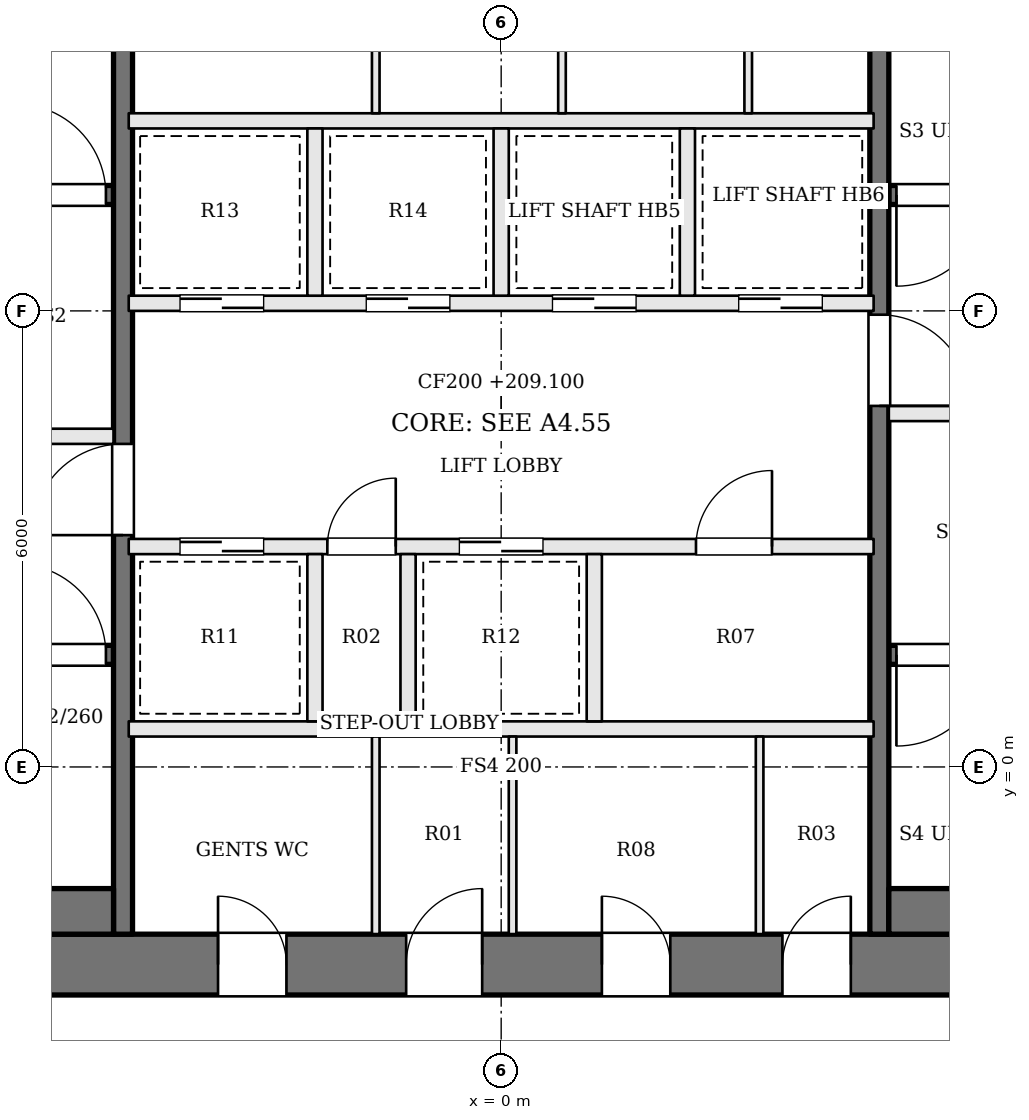
"""IFC4 building model, lengths in metres.
Left out: names, types, materials, properties, quantities, classifications, styles, units other than length and angle.
Written with IfcOpenShell. Run it as: python <this file> out.ifc"""

import sys

from ifc_helpers import new_model, si_unit, direction, frame, frame_2d, origin, place, context, subcontext, project, spatial, rectangle, extrude, element, fill, save


model = new_model("IFC4")
c1 = context("Model", 3, precision=1e-05, world=origin(), true_north=direction((0.0, 1.0)))
c2 = subcontext(c1, "Body", "Model", "MODEL_VIEW")
j1 = project(units=[si_unit("LENGTHUNIT", "METRE"), si_unit("PLANEANGLEUNIT", "RADIAN")], contexts=[c1])
p1 = place(None, origin())
s1 = spatial("IfcSite", under=j1, at=p1, CompositionType="ELEMENT")
p2 = place(p1, origin())
s2 = spatial("IfcBuilding", under=s1, at=p2, CompositionType="ELEMENT")
p3 = place(p2, frame((0.0, 0.0, 209.1)))
s3 = spatial("IfcBuildingStorey", under=s2, at=p3, CompositionType="ELEMENT", Elevation=209.1)
p4 = place(p3, frame((-13.0, -2.6, 0.0), z_axis=(0.0, 0.0, 1.0), x_axis=(1.0, 0.0, 0.0)))
e1 = element("IfcWall", 1, at=p4, inside=s3, PredefinedType="SHEAR", context=c2, shape_type="SweptSolid", body=[
    extrude(rectangle(XDim=26.0, YDim=0.8, at=frame_2d((13.0, 0.0))), origin(), (0.0, 0.0, 1.0), 3.9),
])
p5 = place(p4, frame((9.275, 0.0, 0.0)))
e2 = element("IfcOpeningElement", 2, at=p5, cuts=e1, PredefinedType="OPENING", context=c2, shape_type="SweptSolid", body=[
    extrude(rectangle(XDim=0.9, YDim=2.1, at=frame_2d((0.45, 1.05))), frame((0.0, 0.41, 0.0), z_axis=(0.0, -1.0, 0.0), x_axis=(1.0, 0.0, 0.0)), (0.0, 0.0, 1.0), 0.82),
])
p6 = place(p4, frame((11.75, 0.0, 0.0)))
e3 = element("IfcOpeningElement", 3, at=p6, cuts=e1, PredefinedType="OPENING", context=c2, shape_type="SweptSolid", body=[
    extrude(rectangle(XDim=1.0, YDim=2.1, at=frame_2d((0.5, 1.05))), frame((0.0, 0.41, 0.0), z_axis=(0.0, -1.0, 0.0), x_axis=(1.0, 0.0, 0.0)), (0.0, 0.0, 1.0), 0.82),
])
p7 = place(p4, frame((14.325, 0.0, 0.0)))
e4 = element("IfcOpeningElement", 4, at=p7, cuts=e1, PredefinedType="OPENING", context=c2, shape_type="SweptSolid", body=[
    extrude(rectangle(XDim=0.9, YDim=2.1, at=frame_2d((0.45, 1.05))), frame((0.0, 0.41, 0.0), z_axis=(0.0, -1.0, 0.0), x_axis=(1.0, 0.0, 0.0)), (0.0, 0.0, 1.0), 0.82),
])
p8 = place(p4, frame((16.7, 0.0, 0.0)))
e5 = element("IfcOpeningElement", 5, at=p8, cuts=e1, PredefinedType="OPENING", context=c2, shape_type="SweptSolid", body=[
    extrude(rectangle(XDim=0.9, YDim=2.1, at=frame_2d((0.45, 1.05))), frame((0.0, 0.41, 0.0), z_axis=(0.0, -1.0, 0.0), x_axis=(1.0, 0.0, 0.0)), (0.0, 0.0, 1.0), 0.82),
])
p9 = place(p3, frame((-12.2, 1.475, 0.0), z_axis=(0.0, 0.0, 1.0), x_axis=(1.0, 0.0, 0.0)))
e6 = element("IfcWall", 6, at=p9, inside=s3, PredefinedType="SOLIDWALL", context=c2, shape_type="SweptSolid", body=[
    extrude(rectangle(XDim=7.1, YDim=0.25, at=frame_2d((3.55, 0.0))), origin(), (0.0, 0.0, 1.0), 3.7),
])
p10 = place(p9, frame((5.8, 0.0, 0.0)))
e7 = element("IfcOpeningElement", 7, at=p10, cuts=e6, PredefinedType="OPENING", context=c2, shape_type="SweptSolid", body=[
    extrude(rectangle(XDim=1.2, YDim=2.1, at=frame_2d((0.6, 1.05))), frame((0.0, 0.135, 0.0), z_axis=(0.0, -1.0, 0.0), x_axis=(1.0, 0.0, 0.0)), (0.0, 0.0, 1.0), 0.27),
])
p11 = place(p3, frame((12.2, 7.525, 0.0), z_axis=(0.0, 0.0, 1.0), x_axis=(-1.0, 0.0, 0.0)))
e8 = element("IfcWall", 8, at=p11, inside=s3, PredefinedType="SOLIDWALL", context=c2, shape_type="SweptSolid", body=[
    extrude(rectangle(XDim=7.1, YDim=0.25, at=frame_2d((3.55, 0.0))), origin(), (0.0, 0.0, 1.0), 3.7),
])
p12 = place(p11, frame((5.8, 0.0, 0.0)))
e9 = element("IfcOpeningElement", 9, at=p12, cuts=e8, PredefinedType="OPENING", context=c2, shape_type="SweptSolid", body=[
    extrude(rectangle(XDim=1.2, YDim=2.1, at=frame_2d((0.6, 1.05))), frame((0.0, 0.135, 0.0), z_axis=(0.0, -1.0, 0.0), x_axis=(1.0, 0.0, 0.0)), (0.0, 0.0, 1.0), 0.27),
])
p13 = place(p3, frame((-12.2, 4.35, 0.0), z_axis=(0.0, 0.0, 1.0), x_axis=(1.0, 0.0, 0.0)))
e10 = element("IfcWall", 10, at=p13, inside=s3, PredefinedType="SOLIDWALL", context=c2, shape_type="SweptSolid", body=[
    extrude(rectangle(XDim=7.1, YDim=0.2, at=frame_2d((3.55, 0.0))), origin(), (0.0, 0.0, 1.0), 3.7),
])
p14 = place(p13, frame((4.4, 0.0, 0.0)))
e11 = element("IfcOpeningElement", 11, at=p14, cuts=e10, PredefinedType="OPENING", context=c2, shape_type="SweptSolid", body=[
    extrude(rectangle(XDim=1.2, YDim=2.1, at=frame_2d((0.6, 1.05))), frame((0.0, 0.11, 0.0), z_axis=(0.0, -1.0, 0.0), x_axis=(1.0, 0.0, 0.0)), (0.0, 0.0, 1.0), 0.22),
])
p15 = place(p13, frame((1.1, 0.0, 0.0)))
e12 = element("IfcOpeningElement", 12, at=p15, cuts=e10, PredefinedType="OPENING", context=c2, shape_type="SweptSolid", body=[
    extrude(rectangle(XDim=1.2, YDim=2.1, at=frame_2d((0.6, 1.05))), frame((0.0, 0.11, 0.0), z_axis=(0.0, -1.0, 0.0), x_axis=(1.0, 0.0, 0.0)), (0.0, 0.0, 1.0), 0.22),
])
p16 = place(p3, frame((12.2, 4.65, 0.0), z_axis=(0.0, 0.0, 1.0), x_axis=(-1.0, 0.0, 0.0)))
e13 = element("IfcWall", 13, at=p16, inside=s3, PredefinedType="SOLIDWALL", context=c2, shape_type="SweptSolid", body=[
    extrude(rectangle(XDim=7.1, YDim=0.2, at=frame_2d((3.55, 0.0))), origin(), (0.0, 0.0, 1.0), 3.7),
])
p17 = place(p16, frame((4.4, 0.0, 0.0)))
e14 = element("IfcOpeningElement", 14, at=p17, cuts=e13, PredefinedType="OPENING", context=c2, shape_type="SweptSolid", body=[
    extrude(rectangle(XDim=1.2, YDim=2.1, at=frame_2d((0.6, 1.05))), frame((0.0, 0.11, 0.0), z_axis=(0.0, -1.0, 0.0), x_axis=(1.0, 0.0, 0.0)), (0.0, 0.0, 1.0), 0.22),
])
p18 = place(p16, frame((1.1, 0.0, 0.0)))
e15 = element("IfcOpeningElement", 15, at=p18, cuts=e13, PredefinedType="OPENING", context=c2, shape_type="SweptSolid", body=[
    extrude(rectangle(XDim=1.2, YDim=2.1, at=frame_2d((0.6, 1.05))), frame((0.0, 0.11, 0.0), z_axis=(0.0, -1.0, 0.0), x_axis=(1.0, 0.0, 0.0)), (0.0, 0.0, 1.0), 0.22),
])
p19 = place(p3, frame((-12.2, 7.525, 0.0), z_axis=(0.0, 0.0, 1.0), x_axis=(1.0, 0.0, 0.0)))
e16 = element("IfcWall", 16, at=p19, inside=s3, PredefinedType="SOLIDWALL", context=c2, shape_type="SweptSolid", body=[
    extrude(rectangle(XDim=7.1, YDim=0.25, at=frame_2d((3.55, 0.0))), origin(), (0.0, 0.0, 1.0), 3.7),
])
p20 = place(p19, frame((5.8, 0.0, 0.0)))
e17 = element("IfcOpeningElement", 17, at=p20, cuts=e16, PredefinedType="OPENING", context=c2, shape_type="SweptSolid", body=[
    extrude(rectangle(XDim=1.2, YDim=2.1, at=frame_2d((0.6, 1.05))), frame((0.0, 0.135, 0.0), z_axis=(0.0, -1.0, 0.0), x_axis=(1.0, 0.0, 0.0)), (0.0, 0.0, 1.0), 0.27),
])
p21 = place(p3, frame((12.2, 1.475, 0.0), z_axis=(0.0, 0.0, 1.0), x_axis=(-1.0, 0.0, 0.0)))
e18 = element("IfcWall", 18, at=p21, inside=s3, PredefinedType="SOLIDWALL", context=c2, shape_type="SweptSolid", body=[
    extrude(rectangle(XDim=7.1, YDim=0.25, at=frame_2d((3.55, 0.0))), origin(), (0.0, 0.0, 1.0), 3.7),
])
p22 = place(p21, frame((5.8, 0.0, 0.0)))
e19 = element("IfcOpeningElement", 19, at=p22, cuts=e18, PredefinedType="OPENING", context=c2, shape_type="SweptSolid", body=[
    extrude(rectangle(XDim=1.2, YDim=2.1, at=frame_2d((0.6, 1.05))), frame((0.0, 0.135, 0.0), z_axis=(0.0, -1.0, 0.0), x_axis=(1.0, 0.0, 0.0)), (0.0, 0.0, 1.0), 0.27),
])
p23 = place(p3, frame((-4.975, -2.2, 0.0), z_axis=(0.0, 0.0, 1.0), x_axis=(0.0, 1.0, 0.0)))
e20 = element("IfcWall", 20, at=p23, inside=s3, PredefinedType="SOLIDWALL", context=c2, shape_type="SweptSolid", body=[
    extrude(rectangle(XDim=13.4, YDim=0.25, at=frame_2d((6.7, 0.0))), origin(), (0.0, 0.0, 1.0), 3.7),
])
p24 = place(p23, frame((5.25, 0.0, 0.0)))
e21 = element("IfcOpeningElement", 21, at=p24, cuts=e20, PredefinedType="OPENING", context=c2, shape_type="SweptSolid", body=[
    extrude(rectangle(XDim=1.2, YDim=2.1, at=frame_2d((0.6, 1.05))), frame((0.0, 0.135, 0.0), z_axis=(0.0, -1.0, 0.0), x_axis=(1.0, 0.0, 0.0)), (0.0, 0.0, 1.0), 0.27),
])
p25 = place(p3, frame((4.975, 11.2, 0.0), z_axis=(0.0, 0.0, 1.0), x_axis=(0.0, -1.0, 0.0)))
e22 = element("IfcWall", 22, at=p25, inside=s3, PredefinedType="SOLIDWALL", context=c2, shape_type="SweptSolid", body=[
    extrude(rectangle(XDim=13.4, YDim=0.25, at=frame_2d((6.7, 0.0))), origin(), (0.0, 0.0, 1.0), 3.7),
])
p26 = place(p25, frame((5.25, 0.0, 0.0)))
e23 = element("IfcOpeningElement", 23, at=p26, cuts=e22, PredefinedType="OPENING", context=c2, shape_type="SweptSolid", body=[
    extrude(rectangle(XDim=1.2, YDim=2.1, at=frame_2d((0.6, 1.05))), frame((0.0, 0.135, 0.0), z_axis=(0.0, -1.0, 0.0), x_axis=(1.0, 0.0, 0.0)), (0.0, 0.0, 1.0), 0.27),
])
for number, where, z_axis, x_axis in (
    (24, (-12.2, -1.9, 0.0), (0.0, 0.0, 1.0), (1.0, 0.0, 0.0)),
    (25, (12.2, -1.9, 0.0), (0.0, 0.0, 1.0), (-1.0, 0.0, 0.0)),
):
    element("IfcWall", number, at=place(p3, frame(where, z_axis=z_axis, x_axis=x_axis)), inside=s3, PredefinedType="SOLIDWALL", context=c2, shape_type="SweptSolid", body=[
        extrude(rectangle(XDim=7.1, YDim=0.6, at=frame_2d((3.55, 0.0))), origin(), (0.0, 0.0, 1.0), 3.7),
    ])
p27 = place(p3, frame((-4.9, 0.5, 0.0), z_axis=(0.0, 0.0, 1.0), x_axis=(1.0, 0.0, 0.0)))
e26 = element("IfcWall", 26, at=p27, inside=s3, PredefinedType="SOLIDWALL", context=c2, shape_type="SweptSolid", body=[
    extrude(rectangle(XDim=9.8, YDim=0.2, at=frame_2d((4.9, 0.0))), origin(), (0.0, 0.0, 1.0), 3.7),
])
p28 = place(p3, frame((-4.9, 2.9, 0.0), z_axis=(0.0, 0.0, 1.0), x_axis=(1.0, 0.0, 0.0)))
e27 = element("IfcWall", 27, at=p28, inside=s3, PredefinedType="SOLIDWALL", context=c2, shape_type="SweptSolid", body=[
    extrude(rectangle(XDim=9.8, YDim=0.2, at=frame_2d((4.9, 0.0))), origin(), (0.0, 0.0, 1.0), 3.7),
])
p29 = place(p28, frame((0.675, 0.0, 0.0)))
e28 = element("IfcOpeningElement", 28, at=p29, cuts=e27, PredefinedType="OPENING", context=c2, shape_type="SweptSolid", body=[
    extrude(rectangle(XDim=1.1, YDim=2.1, at=frame_2d((0.55, 1.05))), frame((0.0, 0.11, 0.0), z_axis=(0.0, -1.0, 0.0), x_axis=(1.0, 0.0, 0.0)), (0.0, 0.0, 1.0), 0.22),
])
p30 = place(p28, frame((2.613, 0.0, 0.0)))
e29 = element("IfcOpeningElement", 29, at=p30, cuts=e27, PredefinedType="OPENING", context=c2, shape_type="SweptSolid", body=[
    extrude(rectangle(XDim=0.9, YDim=2.1, at=frame_2d((0.45, 1.05))), frame((0.0, 0.11, 0.0), z_axis=(0.0, -1.0, 0.0), x_axis=(1.0, 0.0, 0.0)), (0.0, 0.0, 1.0), 0.22),
])
p31 = place(p28, frame((4.35, 0.0, 0.0)))
e30 = element("IfcOpeningElement", 30, at=p31, cuts=e27, PredefinedType="OPENING", context=c2, shape_type="SweptSolid", body=[
    extrude(rectangle(XDim=1.1, YDim=2.1, at=frame_2d((0.55, 1.05))), frame((0.0, 0.11, 0.0), z_axis=(0.0, -1.0, 0.0), x_axis=(1.0, 0.0, 0.0)), (0.0, 0.0, 1.0), 0.22),
])
p32 = place(p28, frame((7.463, 0.0, 0.0)))
e31 = element("IfcOpeningElement", 31, at=p32, cuts=e27, PredefinedType="OPENING", context=c2, shape_type="SweptSolid", body=[
    extrude(rectangle(XDim=1.0, YDim=2.1, at=frame_2d((0.5, 1.05))), frame((0.0, 0.11, 0.0), z_axis=(0.0, -1.0, 0.0), x_axis=(1.0, 0.0, 0.0)), (0.0, 0.0, 1.0), 0.22),
])
p33 = place(p3, frame((-4.9, 6.1, 0.0), z_axis=(0.0, 0.0, 1.0), x_axis=(1.0, 0.0, 0.0)))
e32 = element("IfcWall", 32, at=p33, inside=s3, PredefinedType="SOLIDWALL", context=c2, shape_type="SweptSolid", body=[
    extrude(rectangle(XDim=9.8, YDim=0.2, at=frame_2d((4.9, 0.0))), origin(), (0.0, 0.0, 1.0), 3.7),
])
p34 = place(p33, frame((0.675, 0.0, 0.0)))
e33 = element("IfcOpeningElement", 33, at=p34, cuts=e32, PredefinedType="OPENING", context=c2, shape_type="SweptSolid", body=[
    extrude(rectangle(XDim=1.1, YDim=2.1, at=frame_2d((0.55, 1.05))), frame((0.0, 0.11, 0.0), z_axis=(0.0, -1.0, 0.0), x_axis=(1.0, 0.0, 0.0)), (0.0, 0.0, 1.0), 0.22),
])
p35 = place(p33, frame((3.125, 0.0, 0.0)))
e34 = element("IfcOpeningElement", 34, at=p35, cuts=e32, PredefinedType="OPENING", context=c2, shape_type="SweptSolid", body=[
    extrude(rectangle(XDim=1.1, YDim=2.1, at=frame_2d((0.55, 1.05))), frame((0.0, 0.11, 0.0), z_axis=(0.0, -1.0, 0.0), x_axis=(1.0, 0.0, 0.0)), (0.0, 0.0, 1.0), 0.22),
])
p36 = place(p33, frame((5.575, 0.0, 0.0)))
e35 = element("IfcOpeningElement", 35, at=p36, cuts=e32, PredefinedType="OPENING", context=c2, shape_type="SweptSolid", body=[
    extrude(rectangle(XDim=1.1, YDim=2.1, at=frame_2d((0.55, 1.05))), frame((0.0, 0.11, 0.0), z_axis=(0.0, -1.0, 0.0), x_axis=(1.0, 0.0, 0.0)), (0.0, 0.0, 1.0), 0.22),
])
p37 = place(p33, frame((8.025, 0.0, 0.0)))
e36 = element("IfcOpeningElement", 36, at=p37, cuts=e32, PredefinedType="OPENING", context=c2, shape_type="SweptSolid", body=[
    extrude(rectangle(XDim=1.1, YDim=2.1, at=frame_2d((0.55, 1.05))), frame((0.0, 0.11, 0.0), z_axis=(0.0, -1.0, 0.0), x_axis=(1.0, 0.0, 0.0)), (0.0, 0.0, 1.0), 0.22),
])
p38 = place(p3, frame((-4.9, 8.5, 0.0), z_axis=(0.0, 0.0, 1.0), x_axis=(1.0, 0.0, 0.0)))
e37 = element("IfcWall", 37, at=p38, inside=s3, PredefinedType="SOLIDWALL", context=c2, shape_type="SweptSolid", body=[
    extrude(rectangle(XDim=9.8, YDim=0.2, at=frame_2d((4.9, 0.0))), origin(), (0.0, 0.0, 1.0), 3.7),
])
for number, where, z_axis, x_axis in (
    (38, (-2.45, 0.6, 0.0), (0.0, 0.0, 1.0), (0.0, 1.0, 0.0)),
    (39, (-1.225, 0.6, 0.0), (0.0, 0.0, 1.0), (0.0, 1.0, 0.0)),
    (40, (1.225, 0.6, 0.0), (0.0, 0.0, 1.0), (0.0, 1.0, 0.0)),
    (41, (-2.45, 6.2, 0.0), (0.0, 0.0, 1.0), (0.0, 1.0, 0.0)),
    (42, (0.0, 6.2, 0.0), (0.0, 0.0, 1.0), (0.0, 1.0, 0.0)),
    (43, (2.45, 6.2, 0.0), (0.0, 0.0, 1.0), (0.0, 1.0, 0.0)),
):
    element("IfcWall", number, at=place(p3, frame(where, z_axis=z_axis, x_axis=x_axis)), inside=s3, PredefinedType="SOLIDWALL", context=c2, shape_type="SweptSolid", body=[
        extrude(rectangle(XDim=2.2, YDim=0.2, at=frame_2d((1.1, 0.0))), origin(), (0.0, 0.0, 1.0), 3.7),
    ])
for number, where, z_axis, x_axis in (
    (44, (-1.65, -2.2, 0.0), (0.0, 0.0, 1.0), (0.0, 1.0, 0.0)),
    (45, (0.15, -2.2, 0.0), (0.0, 0.0, 1.0), (0.0, 1.0, 0.0)),
    (46, (3.4, -2.2, 0.0), (0.0, 0.0, 1.0), (0.0, 1.0, 0.0)),
    (47, (-1.65, 8.6, 0.0), (0.0, 0.0, 1.0), (0.0, 1.0, 0.0)),
    (48, (0.8, 8.6, 0.0), (0.0, 0.0, 1.0), (0.0, 1.0, 0.0)),
    (49, (3.25, 8.6, 0.0), (0.0, 0.0, 1.0), (0.0, 1.0, 0.0)),
):
    element("IfcWall", number, at=place(p3, frame(where, z_axis=z_axis, x_axis=x_axis)), inside=s3, PredefinedType="PARTITIONING", context=c2, shape_type="SweptSolid", body=[
        extrude(rectangle(XDim=2.6, YDim=0.1, at=frame_2d((1.3, 0.0))), origin(), (0.0, 0.0, 1.0), 3.7),
    ])
p39 = place(p24, origin())
e50 = element("IfcDoor", 50, at=p39, inside=s3, OperationType="SINGLE_SWING_LEFT", PredefinedType="DOOR", context=c2, shape_type="SweptSolid", body=[
    extrude(rectangle(XDim=1.2, YDim=2.1, at=frame_2d((0.6, 1.05))), frame((0.0, 0.025, 0.0), z_axis=(0.0, -1.0, 0.0), x_axis=(1.0, 0.0, 0.0)), (0.0, 0.0, 1.0), 0.05),
])
fill(e21, e50)
p40 = place(p26, origin())
e51 = element("IfcDoor", 51, at=p40, inside=s3, OperationType="SINGLE_SWING_RIGHT", PredefinedType="DOOR", context=c2, shape_type="SweptSolid", body=[
    extrude(rectangle(XDim=1.2, YDim=2.1, at=frame_2d((0.6, 1.05))), frame((0.0, 0.025, 0.0), z_axis=(0.0, -1.0, 0.0), x_axis=(1.0, 0.0, 0.0)), (0.0, 0.0, 1.0), 0.05),
])
fill(e23, e51)
p41 = place(p10, origin())
e52 = element("IfcDoor", 52, at=p41, inside=s3, OperationType="SINGLE_SWING_LEFT", PredefinedType="DOOR", context=c2, shape_type="SweptSolid", body=[
    extrude(rectangle(XDim=1.2, YDim=2.1, at=frame_2d((0.6, 1.05))), frame((0.0, 0.025, 0.0), z_axis=(0.0, -1.0, 0.0), x_axis=(1.0, 0.0, 0.0)), (0.0, 0.0, 1.0), 0.05),
])
fill(e7, e52)
p42 = place(p12, origin())
e53 = element("IfcDoor", 53, at=p42, inside=s3, OperationType="SINGLE_SWING_RIGHT", PredefinedType="DOOR", context=c2, shape_type="SweptSolid", body=[
    extrude(rectangle(XDim=1.2, YDim=2.1, at=frame_2d((0.6, 1.05))), frame((0.0, 0.025, 0.0), z_axis=(0.0, -1.0, 0.0), x_axis=(1.0, 0.0, 0.0)), (0.0, 0.0, 1.0), 0.05),
])
fill(e9, e53)
p43 = place(p20, origin())
e54 = element("IfcDoor", 54, at=p43, inside=s3, OperationType="SINGLE_SWING_LEFT", PredefinedType="DOOR", context=c2, shape_type="SweptSolid", body=[
    extrude(rectangle(XDim=1.2, YDim=2.1, at=frame_2d((0.6, 1.05))), frame((0.0, 0.025, 0.0), z_axis=(0.0, -1.0, 0.0), x_axis=(1.0, 0.0, 0.0)), (0.0, 0.0, 1.0), 0.05),
])
fill(e17, e54)
p44 = place(p22, origin())
e55 = element("IfcDoor", 55, at=p44, inside=s3, OperationType="SINGLE_SWING_RIGHT", PredefinedType="DOOR", context=c2, shape_type="SweptSolid", body=[
    extrude(rectangle(XDim=1.2, YDim=2.1, at=frame_2d((0.6, 1.05))), frame((0.0, 0.025, 0.0), z_axis=(0.0, -1.0, 0.0), x_axis=(1.0, 0.0, 0.0)), (0.0, 0.0, 1.0), 0.05),
])
fill(e19, e55)
p45 = place(p29, origin())
e56 = element("IfcDoor", 56, at=p45, inside=s3, OperationType="SLIDING_TO_RIGHT", PredefinedType="DOOR", context=c2, shape_type="SweptSolid", body=[
    extrude(rectangle(XDim=1.1, YDim=2.1, at=frame_2d((0.55, 1.05))), frame((0.0, 0.025, 0.0), z_axis=(0.0, -1.0, 0.0), x_axis=(1.0, 0.0, 0.0)), (0.0, 0.0, 1.0), 0.05),
])
fill(e28, e56)
p46 = place(p30, origin())
e57 = element("IfcDoor", 57, at=p46, inside=s3, OperationType="SINGLE_SWING_RIGHT", PredefinedType="DOOR", context=c2, shape_type="SweptSolid", body=[
    extrude(rectangle(XDim=0.9, YDim=2.1, at=frame_2d((0.45, 1.05))), frame((0.0, 0.025, 0.0), z_axis=(0.0, -1.0, 0.0), x_axis=(1.0, 0.0, 0.0)), (0.0, 0.0, 1.0), 0.05),
])
fill(e29, e57)
p47 = place(p31, origin())
e58 = element("IfcDoor", 58, at=p47, inside=s3, OperationType="SLIDING_TO_LEFT", PredefinedType="DOOR", context=c2, shape_type="SweptSolid", body=[
    extrude(rectangle(XDim=1.1, YDim=2.1, at=frame_2d((0.55, 1.05))), frame((0.0, 0.025, 0.0), z_axis=(0.0, -1.0, 0.0), x_axis=(1.0, 0.0, 0.0)), (0.0, 0.0, 1.0), 0.05),
])
fill(e30, e58)
p48 = place(p32, origin())
e59 = element("IfcDoor", 59, at=p48, inside=s3, OperationType="SINGLE_SWING_RIGHT", PredefinedType="DOOR", context=c2, shape_type="SweptSolid", body=[
    extrude(rectangle(XDim=1.0, YDim=2.1, at=frame_2d((0.5, 1.05))), frame((0.0, 0.025, 0.0), z_axis=(0.0, -1.0, 0.0), x_axis=(1.0, 0.0, 0.0)), (0.0, 0.0, 1.0), 0.05),
])
fill(e31, e59)
p49 = place(p34, origin())
e60 = element("IfcDoor", 60, at=p49, inside=s3, OperationType="SLIDING_TO_RIGHT", PredefinedType="DOOR", context=c2, shape_type="SweptSolid", body=[
    extrude(rectangle(XDim=1.1, YDim=2.1, at=frame_2d((0.55, 1.05))), frame((0.0, 0.025, 0.0), z_axis=(0.0, -1.0, 0.0), x_axis=(1.0, 0.0, 0.0)), (0.0, 0.0, 1.0), 0.05),
])
fill(e33, e60)
p50 = place(p35, origin())
e61 = element("IfcDoor", 61, at=p50, inside=s3, OperationType="SLIDING_TO_LEFT", PredefinedType="DOOR", context=c2, shape_type="SweptSolid", body=[
    extrude(rectangle(XDim=1.1, YDim=2.1, at=frame_2d((0.55, 1.05))), frame((0.0, 0.025, 0.0), z_axis=(0.0, -1.0, 0.0), x_axis=(1.0, 0.0, 0.0)), (0.0, 0.0, 1.0), 0.05),
])
fill(e34, e61)
p51 = place(p36, origin())
e62 = element("IfcDoor", 62, at=p51, inside=s3, OperationType="SLIDING_TO_RIGHT", PredefinedType="DOOR", context=c2, shape_type="SweptSolid", body=[
    extrude(rectangle(XDim=1.1, YDim=2.1, at=frame_2d((0.55, 1.05))), frame((0.0, 0.025, 0.0), z_axis=(0.0, -1.0, 0.0), x_axis=(1.0, 0.0, 0.0)), (0.0, 0.0, 1.0), 0.05),
])
fill(e35, e62)
p52 = place(p37, origin())
e63 = element("IfcDoor", 63, at=p52, inside=s3, OperationType="SLIDING_TO_LEFT", PredefinedType="DOOR", context=c2, shape_type="SweptSolid", body=[
    extrude(rectangle(XDim=1.1, YDim=2.1, at=frame_2d((0.55, 1.05))), frame((0.0, 0.025, 0.0), z_axis=(0.0, -1.0, 0.0), x_axis=(1.0, 0.0, 0.0)), (0.0, 0.0, 1.0), 0.05),
])
fill(e36, e63)
p53 = place(p5, origin())
e64 = element("IfcDoor", 64, at=p53, inside=s3, OperationType="SINGLE_SWING_LEFT", PredefinedType="DOOR", context=c2, shape_type="SweptSolid", body=[
    extrude(rectangle(XDim=0.9, YDim=2.1, at=frame_2d((0.45, 1.05))), frame((0.0, 0.025, 0.0), z_axis=(0.0, -1.0, 0.0), x_axis=(1.0, 0.0, 0.0)), (0.0, 0.0, 1.0), 0.05),
])
fill(e2, e64)
p54 = place(p6, origin())
e65 = element("IfcDoor", 65, at=p54, inside=s3, OperationType="SINGLE_SWING_RIGHT", PredefinedType="DOOR", context=c2, shape_type="SweptSolid", body=[
    extrude(rectangle(XDim=1.0, YDim=2.1, at=frame_2d((0.5, 1.05))), frame((0.0, 0.025, 0.0), z_axis=(0.0, -1.0, 0.0), x_axis=(1.0, 0.0, 0.0)), (0.0, 0.0, 1.0), 0.05),
])
fill(e3, e65)
p55 = place(p7, origin())
e66 = element("IfcDoor", 66, at=p55, inside=s3, OperationType="SINGLE_SWING_LEFT", PredefinedType="DOOR", context=c2, shape_type="SweptSolid", body=[
    extrude(rectangle(XDim=0.9, YDim=2.1, at=frame_2d((0.45, 1.05))), frame((0.0, 0.025, 0.0), z_axis=(0.0, -1.0, 0.0), x_axis=(1.0, 0.0, 0.0)), (0.0, 0.0, 1.0), 0.05),
])
fill(e4, e66)
p56 = place(p8, origin())
e67 = element("IfcDoor", 67, at=p56, inside=s3, OperationType="SINGLE_SWING_RIGHT", PredefinedType="DOOR", context=c2, shape_type="SweptSolid", body=[
    extrude(rectangle(XDim=0.9, YDim=2.1, at=frame_2d((0.45, 1.05))), frame((0.0, 0.025, 0.0), z_axis=(0.0, -1.0, 0.0), x_axis=(1.0, 0.0, 0.0)), (0.0, 0.0, 1.0), 0.05),
])
fill(e5, e67)
save(model, sys.argv[1])
